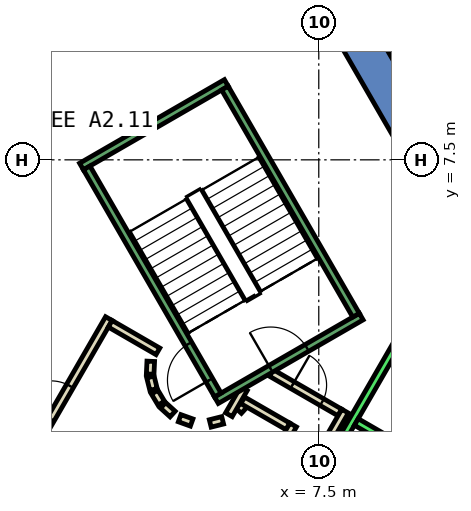
"""IFC4 building model, lengths in metres.
Left out: names, types, materials, properties, quantities, classifications, styles, units other than length and angle.
Written with IfcOpenShell. Run it as: python <this file> out.ifc"""

import sys

from ifc_helpers import new_model, si_unit, direction, frame, frame_2d, origin, place, context, subcontext, project, spatial, polyline, rectangle, outline, extrude, element, fill, save


model = new_model("IFC4")
c1 = context("Model", 3, precision=1e-05, world=origin(), true_north=direction((0.0, 1.0)))
c2 = subcontext(c1, "Body", "Model", "MODEL_VIEW")
j1 = project(units=[si_unit("LENGTHUNIT", "METRE"), si_unit("PLANEANGLEUNIT", "RADIAN")], contexts=[c1])
p1 = place(None, origin())
s1 = spatial("IfcSite", under=j1, at=p1, CompositionType="ELEMENT")
p2 = place(p1, origin())
s2 = spatial("IfcBuilding", under=s1, at=p2, CompositionType="ELEMENT")
p3 = place(p2, frame((0.0, 0.0, 39.2)))
s3 = spatial("IfcBuildingStorey", under=s2, at=p3, CompositionType="ELEMENT", Elevation=39.2)
p4 = place(p3, frame((0.0, 0.0, -0.4)))
e1 = element("IfcWall", 1, at=p4, inside=s3, PredefinedType="SHEAR", context=c2, shape_type="SweptSolid", body=[
    extrude(outline(polyline([(8.517, 11.748), (7.651, 11.248), (12.702, 2.5), (13.856, 2.5), (8.517, 11.748)])), origin(), (0.0, 0.0, 1.0), 4.2),
])
p5 = place(p3, frame((5.39, 0.898, 0.0), z_axis=(0.0, 0.0, 1.0), x_axis=(0.673828488714, 0.738887791073, 0.0)))
e2 = element("IfcWall", 2, at=p5, inside=s3, PredefinedType="PARTITIONING", context=c2, shape_type="SweptSolid", body=[
    extrude(rectangle(XDim=0.263, YDim=0.2, at=frame_2d((0.131, 0.0))), origin(), (0.0, 0.0, 1.0), 3.8),
])
p6 = place(p3, frame((5.499, 1.172, 0.0), z_axis=(0.0, 0.0, 1.0), x_axis=(0.866333505267, -0.499465972466, 0.0)))
e3 = element("IfcWall", 3, at=p6, inside=s3, PredefinedType="PARTITIONING", context=c2, shape_type="SweptSolid", body=[
    extrude(rectangle(XDim=1.374, YDim=0.2, at=frame_2d((0.687, 0.0))), origin(), (0.0, 0.0, 1.0), 3.8),
])
p7 = place(p3, frame((6.826, 0.522, 0.0), z_axis=(0.0, 0.0, 1.0), x_axis=(-0.500016722714, -0.866015748706, 0.0)))
e4 = element("IfcWall", 4, at=p7, inside=s3, PredefinedType="PARTITIONING", context=c2, shape_type="SweptSolid", body=[
    extrude(rectangle(XDim=1.7, YDim=0.2, at=frame_2d((0.85, 0.0))), origin(), (0.0, 0.0, 1.0), 3.8),
])
p8 = place(p3, frame((6.25, 1.894, 0.0), z_axis=(0.0, 0.0, 1.0), x_axis=(0.866043184279, -0.499969202016, 0.0)))
e5 = element("IfcWall", 5, at=p8, inside=s3, PredefinedType="PARTITIONING", context=c2, shape_type="SweptSolid", body=[
    extrude(rectangle(XDim=2.084, YDim=0.2, at=frame_2d((1.042, 0.0))), origin(), (0.0, 0.0, 1.0), 3.8),
])
p9 = place(p8, frame((0.642, 0.0, 0.0)))
e6 = element("IfcOpeningElement", 6, at=p9, cuts=e5, PredefinedType="OPENING", context=c2, shape_type="SweptSolid", body=[
    extrude(rectangle(XDim=0.9, YDim=2.1, at=frame_2d((0.45, 1.05))), frame((0.0, 0.11, 0.0), z_axis=(0.0, -1.0, 0.0), x_axis=(1.0, 0.0, 0.0)), (0.0, 0.0, 1.0), 0.22),
])
p10 = place(p3, frame((8.192, 0.888, 0.0), z_axis=(0.0, 0.0, 1.0), x_axis=(-0.499940625693, -0.866059680843, 0.0)))
e7 = element("IfcWall", 7, at=p10, inside=s3, PredefinedType="PARTITIONING", context=c2, shape_type="SweptSolid", body=[
    extrude(rectangle(XDim=2.68, YDim=0.2, at=frame_2d((1.34, 0.0))), origin(), (0.0, 0.0, 1.0), 3.8),
])
p11 = place(p3, frame((5.135, 0.793, 0.0), z_axis=(0.0, 0.0, 1.0), x_axis=(0.499526442893, 0.866298639529, 0.0)))
e8 = element("IfcWall", 8, at=p11, inside=s3, PredefinedType="PARTITIONING", context=c2, shape_type="SweptSolid", body=[
    extrude(rectangle(XDim=0.791, YDim=0.2, at=frame_2d((0.396, 0.0))), origin(), (0.0, 0.0, 1.0), 3.8),
])
p12 = place(p3, frame((-0.52, -1.0, 0.0), z_axis=(0.0, 0.0, 1.0), x_axis=(0.50011622646, 0.865958290007, 0.0)))
e9 = element("IfcWall", 9, at=p12, inside=s3, PredefinedType="PARTITIONING", context=c2, shape_type="SweptSolid", body=[
    extrude(rectangle(XDim=4.991, YDim=0.2, at=frame_2d((2.496, 0.0))), origin(), (0.0, 0.0, 1.0), 3.8),
])
p13 = place(p12, frame((1.945, 0.0, 0.0)))
e10 = element("IfcOpeningElement", 10, at=p13, cuts=e9, PredefinedType="OPENING", context=c2, shape_type="SweptSolid", body=[
    extrude(rectangle(XDim=1.0, YDim=2.1, at=frame_2d((0.5, 1.05))), frame((0.0, 0.11, 0.0), z_axis=(0.0, -1.0, 0.0), x_axis=(1.0, 0.0, 0.0)), (0.0, 0.0, 1.0), 0.22),
])
p14 = place(p3, frame((2.012, 3.186, 0.0), z_axis=(0.0, 0.0, 1.0), x_axis=(0.865891012941, -0.500232699559, 0.0)))
e11 = element("IfcWall", 11, at=p14, inside=s3, PredefinedType="PARTITIONING", context=c2, shape_type="SweptSolid", body=[
    extrude(rectangle(XDim=1.449, YDim=0.2, at=frame_2d((0.725, 0.0))), origin(), (0.0, 0.0, 1.0), 3.8),
])
p15 = place(p3, frame((3.079, 2.199, 0.0), z_axis=(0.0, 0.0, 1.0), x_axis=(-0.047771483479, -0.998858290933, 0.0)))
e12 = element("IfcWall", 12, at=p15, inside=s3, PredefinedType="PARTITIONING", context=c2, shape_type="SweptSolid", body=[
    extrude(rectangle(XDim=0.337, YDim=0.2, at=frame_2d((0.169, 0.0))), origin(), (0.0, 0.0, 1.0), 3.8),
])
p16 = place(p3, frame((3.07, 1.786, 0.0), z_axis=(0.0, 0.0, 1.0), x_axis=(0.242705583207, -0.970099994784, 0.0)))
e13 = element("IfcWall", 13, at=p16, inside=s3, PredefinedType="PARTITIONING", context=c2, shape_type="SweptSolid", body=[
    extrude(rectangle(XDim=0.338, YDim=0.2, at=frame_2d((0.169, 0.0))), origin(), (0.0, 0.0, 1.0), 3.8),
])
for number, where, z_axis, x_axis in (
    (14, (3.182, 1.388, 0.0), (0.0, 0.0, 1.0), (0.512, -0.859, 0.0)),
    (15, (3.404, 1.039, 0.0), (0.0, 0.0, 1.0), (0.74, -0.672, 0.0)),
):
    element("IfcWall", number, at=place(p3, frame(where, z_axis=z_axis, x_axis=x_axis)), inside=s3, PredefinedType="PARTITIONING", context=c2, shape_type="SweptSolid", body=[
        extrude(rectangle(XDim=0.338, YDim=0.2, at=frame_2d((0.169, 0.0))), origin(), (0.0, 0.0, 1.0), 3.8),
    ])
p17 = place(p3, frame((3.838, 0.702, 0.0), z_axis=(0.0, 0.0, 1.0), x_axis=(0.941035081519, -0.338308993895, 0.0)))
e16 = element("IfcWall", 16, at=p17, inside=s3, PredefinedType="PARTITIONING", context=c2, shape_type="SweptSolid", body=[
    extrude(rectangle(XDim=0.337, YDim=0.2, at=frame_2d((0.168, 0.0))), origin(), (0.0, 0.0, 1.0), 3.8),
])
p18 = place(p3, frame((4.644, 0.564, 0.0), z_axis=(0.0, 0.0, 1.0), x_axis=(0.969929076366, 0.243387729394, 0.0)))
e17 = element("IfcWall", 17, at=p18, inside=s3, PredefinedType="PARTITIONING", context=c2, shape_type="SweptSolid", body=[
    extrude(rectangle(XDim=0.337, YDim=0.2, at=frame_2d((0.168, 0.0))), origin(), (0.0, 0.0, 1.0), 3.8),
])
p19 = place(p3, frame((4.451, -6.19, 0.0), z_axis=(0.0, 0.0, 1.0), x_axis=(0.50000090737, 0.866024879913, 0.0)))
e18 = element("IfcWall", 18, at=p19, inside=s3, PredefinedType="STANDARD", context=c2, shape_type="SweptSolid", body=[
    extrude(rectangle(XDim=10.6, YDim=0.2, at=frame_2d((5.3, 0.0))), origin(), (0.0, 0.0, 1.0), 3.8),
])
p20 = place(p3, frame((8.488, 0.602, 0.0), z_axis=(0.0, 0.0, 1.0), x_axis=(0.866022959057, -0.500004234368, 0.0)))
e19 = element("IfcWall", 19, at=p20, inside=s3, PredefinedType="STANDARD", context=c2, shape_type="SweptSolid", body=[
    extrude(rectangle(XDim=2.5, YDim=0.2, at=frame_2d((1.25, 0.0))), origin(), (0.0, 0.0, 1.0), 3.8),
])
p21 = place(p3, frame((4.806, 1.176, 0.0), z_axis=(0.0, 0.0, 1.0), x_axis=(0.866059941101, 0.499940174841, 0.0)))
e20 = element("IfcWall", 20, at=p21, inside=s3, PredefinedType="STANDARD", context=c2, shape_type="SweptSolid", body=[
    extrude(rectangle(XDim=4.4, YDim=0.2, at=frame_2d((2.2, 0.0))), origin(), (0.0, 0.0, 1.0), 3.8),
])
p22 = place(p21, frame((1.65, 0.0, 0.0)))
e21 = element("IfcOpeningElement", 21, at=p22, cuts=e20, PredefinedType="OPENING", context=c2, shape_type="SweptSolid", body=[
    extrude(rectangle(XDim=1.1, YDim=2.2, at=frame_2d((0.55, 1.1))), frame((0.0, 0.11, 0.0), z_axis=(0.0, -1.0, 0.0), x_axis=(1.0, 0.0, 0.0)), (0.0, 0.0, 1.0), 0.22),
])
p23 = place(p3, frame((1.256, 7.324, 0.0), z_axis=(0.0, 0.0, 1.0), x_axis=(0.866046073146, 0.499964197906, 0.0)))
e22 = element("IfcWall", 22, at=p23, inside=s3, PredefinedType="STANDARD", context=c2, shape_type="SweptSolid", body=[
    extrude(rectangle(XDim=4.4, YDim=0.2, at=frame_2d((2.2, 0.0))), origin(), (0.0, 0.0, 1.0), 3.8),
])
p24 = place(p3, frame((4.843, 1.312, 0.0), z_axis=(0.0, 0.0, 1.0), x_axis=(-0.499963383562, 0.866046543262, 0.0)))
e23 = element("IfcWall", 23, at=p24, inside=s3, PredefinedType="STANDARD", context=c2, shape_type="SweptSolid", body=[
    extrude(rectangle(XDim=6.9, YDim=0.2, at=frame_2d((3.45, 0.0))), origin(), (0.0, 0.0, 1.0), 3.8),
])
p25 = place(p24, frame((0.45, 0.0, 0.0)))
e24 = element("IfcOpeningElement", 24, at=p25, cuts=e23, PredefinedType="OPENING", context=c2, shape_type="SweptSolid", body=[
    extrude(rectangle(XDim=1.1, YDim=2.2, at=frame_2d((0.55, 1.1))), frame((0.0, 0.11, 0.0), z_axis=(0.0, -1.0, 0.0), x_axis=(1.0, 0.0, 0.0)), (0.0, 0.0, 1.0), 0.22),
])
p26 = place(p3, frame((8.48, 3.412, 0.0), z_axis=(0.0, 0.0, 1.0), x_axis=(-0.499978703459, 0.866037698999, 0.0)))
e25 = element("IfcWall", 25, at=p26, inside=s3, PredefinedType="STANDARD", context=c2, shape_type="SweptSolid", body=[
    extrude(rectangle(XDim=6.9, YDim=0.2, at=frame_2d((3.45, 0.0))), origin(), (0.0, 0.0, 1.0), 3.8),
])
p27 = place(p13, origin())
e26 = element("IfcDoor", 26, at=p27, inside=s3, OperationType="SINGLE_SWING_LEFT", PredefinedType="DOOR", context=c2, shape_type="SweptSolid", body=[
    extrude(rectangle(XDim=1.0, YDim=2.1, at=frame_2d((0.5, 1.05))), frame((0.0, 0.025, 0.0), z_axis=(0.0, -1.0, 0.0), x_axis=(1.0, 0.0, 0.0)), (0.0, 0.0, 1.0), 0.05),
])
fill(e10, e26)
p28 = place(p9, origin())
e27 = element("IfcDoor", 27, at=p28, inside=s3, OperationType="SINGLE_SWING_LEFT", PredefinedType="DOOR", context=c2, shape_type="SweptSolid", body=[
    extrude(rectangle(XDim=0.9, YDim=2.1, at=frame_2d((0.45, 1.05))), frame((0.0, 0.025, 0.0), z_axis=(0.0, -1.0, 0.0), x_axis=(1.0, 0.0, 0.0)), (0.0, 0.0, 1.0), 0.05),
])
fill(e6, e27)
p29 = place(p25, origin())
e28 = element("IfcDoor", 28, at=p29, inside=s3, OperationType="SINGLE_SWING_LEFT", PredefinedType="DOOR", context=c2, shape_type="SweptSolid", body=[
    extrude(rectangle(XDim=1.1, YDim=2.2, at=frame_2d((0.55, 1.1))), frame((0.0, 0.025, 0.0), z_axis=(0.0, -1.0, 0.0), x_axis=(1.0, 0.0, 0.0)), (0.0, 0.0, 1.0), 0.05),
])
fill(e24, e28)
p30 = place(p22, origin())
e29 = element("IfcDoor", 29, at=p30, inside=s3, OperationType="SINGLE_SWING_LEFT", PredefinedType="DOOR", context=c2, shape_type="SweptSolid", body=[
    extrude(rectangle(XDim=1.1, YDim=2.2, at=frame_2d((0.55, 1.1))), frame((0.0, 0.025, 0.0), z_axis=(0.0, -1.0, 0.0), x_axis=(1.0, 0.0, 0.0)), (0.0, 0.0, 1.0), 0.05),
])
fill(e21, e29)
save(model, sys.argv[1])
